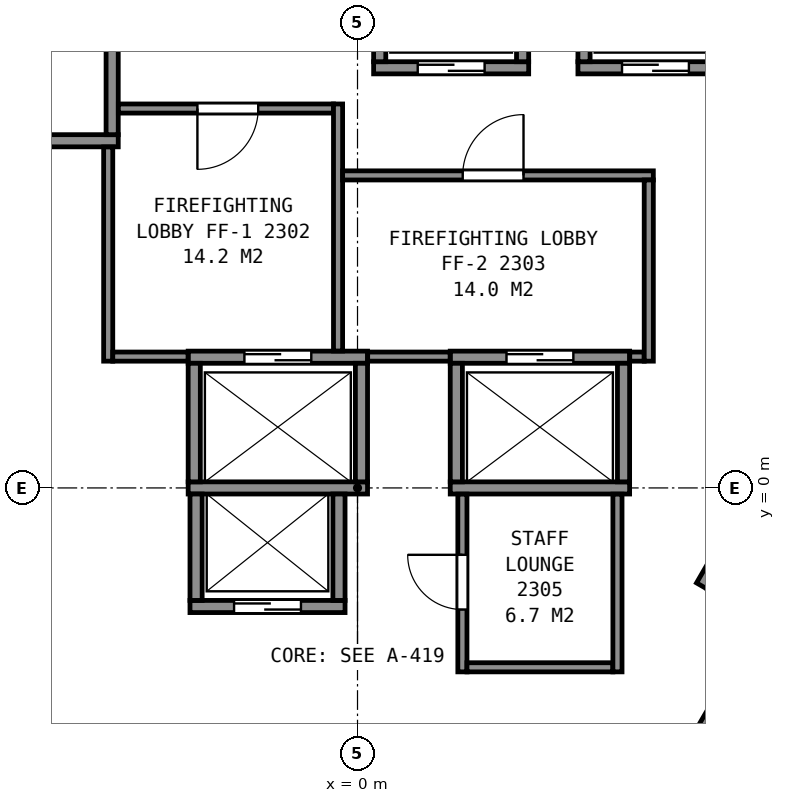
"""IFC4 building model, lengths in metres.
Left out: names, types, materials, properties, quantities, classifications, styles, units other than length and angle.
Written with IfcOpenShell. Run it as: python <this file> out.ifc"""

import sys

from ifc_helpers import new_model, si_unit, direction, frame, frame_2d, origin, place, context, subcontext, project, spatial, rectangle, extrude, element, fill, save


model = new_model("IFC4")
c1 = context("Model", 3, precision=1e-05, world=origin(), true_north=direction((0.0, 1.0)))
c2 = subcontext(c1, "Body", "Model", "MODEL_VIEW")
j1 = project(units=[si_unit("LENGTHUNIT", "METRE"), si_unit("PLANEANGLEUNIT", "RADIAN")], contexts=[c1])
p1 = place(None, origin())
s1 = spatial("IfcSite", under=j1, at=p1, CompositionType="ELEMENT")
p2 = place(p1, origin())
s2 = spatial("IfcBuilding", under=s1, at=p2, CompositionType="ELEMENT")
p3 = place(p2, frame((0.0, 0.0, 100.0)))
s3 = spatial("IfcBuildingStorey", under=s2, at=p3, CompositionType="ELEMENT", Elevation=100.0)
p4 = place(p3, frame((-2.755, -1.95, 0.0), z_axis=(0.0, 0.0, 1.0), x_axis=(1.0, 0.0, 0.0)))
e1 = element("IfcWall", 1, at=p4, inside=s3, PredefinedType="PARTITIONING", context=c2, shape_type="SweptSolid", body=[
    extrude(rectangle(XDim=2.55, YDim=0.2, at=frame_2d((1.275, 0.0))), origin(), (0.0, 0.0, 1.0), 3.6),
])
p5 = place(p4, frame((0.725, 0.0, 0.0)))
e2 = element("IfcOpeningElement", 2, at=p5, cuts=e1, PredefinedType="OPENING", context=c2, shape_type="SweptSolid", body=[
    extrude(rectangle(XDim=1.1, YDim=2.1, at=frame_2d((0.55, 1.05))), frame((0.0, 0.11, 0.0), z_axis=(0.0, -1.0, 0.0), x_axis=(1.0, 0.0, 0.0)), (0.0, 0.0, 1.0), 0.22),
])
p6 = place(p3, frame((-2.785, 0.0, 0.0), z_axis=(0.0, 0.0, 1.0), x_axis=(1.0, 0.0, 0.0)))
e3 = element("IfcWall", 3, at=p6, inside=s3, PredefinedType="PARTITIONING", context=c2, shape_type="SweptSolid", body=[
    extrude(rectangle(XDim=2.95, YDim=0.2, at=frame_2d((1.475, 0.0))), origin(), (0.0, 0.0, 1.0), 3.6),
])
p7 = place(p3, frame((1.525, 0.0, 0.0), z_axis=(0.0, 0.0, 1.0), x_axis=(1.0, 0.0, 0.0)))
e4 = element("IfcWall", 4, at=p7, inside=s3, PredefinedType="PARTITIONING", context=c2, shape_type="SweptSolid", body=[
    extrude(rectangle(XDim=2.95, YDim=0.2, at=frame_2d((1.475, 0.0))), origin(), (0.0, 0.0, 1.0), 3.6),
])
p8 = place(p3, frame((-2.785, 2.15, 0.0), z_axis=(0.0, 0.0, 1.0), x_axis=(1.0, 0.0, 0.0)))
e5 = element("IfcWall", 5, at=p8, inside=s3, PredefinedType="PARTITIONING", context=c2, shape_type="SweptSolid", body=[
    extrude(rectangle(XDim=2.95, YDim=0.2, at=frame_2d((1.475, 0.0))), origin(), (0.0, 0.0, 1.0), 3.6),
])
p9 = place(p8, frame((0.925, 0.0, 0.0)))
e6 = element("IfcOpeningElement", 6, at=p9, cuts=e5, PredefinedType="OPENING", context=c2, shape_type="SweptSolid", body=[
    extrude(rectangle(XDim=1.1, YDim=2.1, at=frame_2d((0.55, 1.05))), frame((0.0, 0.11, 0.0), z_axis=(0.0, -1.0, 0.0), x_axis=(1.0, 0.0, 0.0)), (0.0, 0.0, 1.0), 0.22),
])
p10 = place(p3, frame((1.525, 2.15, 0.0), z_axis=(0.0, 0.0, 1.0), x_axis=(1.0, 0.0, 0.0)))
e7 = element("IfcWall", 7, at=p10, inside=s3, PredefinedType="PARTITIONING", context=c2, shape_type="SweptSolid", body=[
    extrude(rectangle(XDim=2.95, YDim=0.2, at=frame_2d((1.475, 0.0))), origin(), (0.0, 0.0, 1.0), 3.6),
])
p11 = place(p10, frame((0.925, 0.0, 0.0)))
e8 = element("IfcOpeningElement", 8, at=p11, cuts=e7, PredefinedType="OPENING", context=c2, shape_type="SweptSolid", body=[
    extrude(rectangle(XDim=1.1, YDim=2.1, at=frame_2d((0.55, 1.05))), frame((0.0, 0.11, 0.0), z_axis=(0.0, -1.0, 0.0), x_axis=(1.0, 0.0, 0.0)), (0.0, 0.0, 1.0), 0.22),
])
p12 = place(p3, frame((-6.285, 5.71, 0.0), z_axis=(0.0, 0.0, 1.0), x_axis=(1.0, 0.0, 0.0)))
e9 = element("IfcWall", 9, at=p12, inside=s3, PredefinedType="PARTITIONING", context=c2, shape_type="SweptSolid", body=[
    extrude(rectangle(XDim=2.35, YDim=0.2, at=frame_2d((1.175, 0.0))), origin(), (0.0, 0.0, 1.0), 3.6),
])
p13 = place(p3, frame((0.265, 6.91, 0.0), z_axis=(0.0, 0.0, 1.0), x_axis=(1.0, 0.0, 0.0)))
e10 = element("IfcWall", 10, at=p13, inside=s3, PredefinedType="PARTITIONING", context=c2, shape_type="SweptSolid", body=[
    extrude(rectangle(XDim=2.55, YDim=0.2, at=frame_2d((1.275, 0.0))), origin(), (0.0, 0.0, 1.0), 3.6),
])
p14 = place(p13, frame((0.725, 0.0, 0.0)))
e11 = element("IfcOpeningElement", 11, at=p14, cuts=e10, PredefinedType="OPENING", context=c2, shape_type="SweptSolid", body=[
    extrude(rectangle(XDim=1.1, YDim=2.1, at=frame_2d((0.55, 1.05))), frame((0.0, 0.11, 0.0), z_axis=(0.0, -1.0, 0.0), x_axis=(1.0, 0.0, 0.0)), (0.0, 0.0, 1.0), 0.22),
])
p15 = place(p3, frame((3.625, 6.91, 0.0), z_axis=(0.0, 0.0, 1.0), x_axis=(1.0, 0.0, 0.0)))
e12 = element("IfcWall", 12, at=p15, inside=s3, PredefinedType="PARTITIONING", context=c2, shape_type="SweptSolid", body=[
    extrude(rectangle(XDim=2.55, YDim=0.2, at=frame_2d((1.275, 0.0))), origin(), (0.0, 0.0, 1.0), 3.6),
])
p16 = place(p15, frame((0.725, 0.0, 0.0)))
e13 = element("IfcOpeningElement", 13, at=p16, cuts=e12, PredefinedType="OPENING", context=c2, shape_type="SweptSolid", body=[
    extrude(rectangle(XDim=1.1, YDim=2.1, at=frame_2d((0.55, 1.05))), frame((0.0, 0.11, 0.0), z_axis=(0.0, -1.0, 0.0), x_axis=(1.0, 0.0, 0.0)), (0.0, 0.0, 1.0), 0.22),
])
p17 = place(p3, frame((5.527, -4.247, 0.0), z_axis=(0.0, 0.0, 1.0), x_axis=(0.499938297808, 0.866061024631, 0.0)))
e14 = element("IfcWall", 14, at=p17, inside=s3, PredefinedType="PARTITIONING", context=c2, shape_type="SweptSolid", body=[
    extrude(rectangle(XDim=2.35, YDim=0.2, at=frame_2d((1.175, 0.0))), origin(), (0.0, 0.0, 1.0), 3.6),
])
p18 = place(p17, frame((0.725, 0.0, 0.0)))
e15 = element("IfcOpeningElement", 15, at=p18, cuts=e14, PredefinedType="OPENING", context=c2, shape_type="SweptSolid", body=[
    extrude(rectangle(XDim=1.1, YDim=2.1, at=frame_2d((0.55, 1.05))), frame((0.0, 0.11, 0.0), z_axis=(0.0, -1.0, 0.0), x_axis=(1.0, 0.0, 0.0)), (0.0, 0.0, 1.0), 0.22),
])
p19 = place(p3, frame((5.663, -1.612, 0.0), z_axis=(0.0, 0.0, 1.0), x_axis=(0.49998122708, 0.866036242063, 0.0)))
e16 = element("IfcWall", 16, at=p19, inside=s3, PredefinedType="PARTITIONING", context=c2, shape_type="SweptSolid", body=[
    extrude(rectangle(XDim=4.9, YDim=0.2, at=frame_2d((2.45, 0.0))), origin(), (0.0, 0.0, 1.0), 3.6),
])
p20 = place(p3, frame((4.375, 0.1, 0.0), z_axis=(0.0, 0.0, 1.0), x_axis=(0.0, 1.0, 0.0)))
e17 = element("IfcWall", 17, at=p20, inside=s3, PredefinedType="PARTITIONING", context=c2, shape_type="SweptSolid", body=[
    extrude(rectangle(XDim=1.95, YDim=0.2, at=frame_2d((0.975, 0.0))), origin(), (0.0, 0.0, 1.0), 3.6),
])
for number, where, z_axis, x_axis in (
    (18, (3.725, 7.01, 0.0), (0.0, 0.0, 1.0), (0.0, 1.0, 0.0)),
    (19, (2.715, 7.01, 0.0), (0.0, 0.0, 1.0), (0.0, 1.0, 0.0)),
):
    element("IfcWall", number, at=place(p3, frame(where, z_axis=z_axis, x_axis=x_axis)), inside=s3, PredefinedType="PARTITIONING", context=c2, shape_type="SweptSolid", body=[
        extrude(rectangle(XDim=1.75, YDim=0.2, at=frame_2d((0.875, 0.0))), origin(), (0.0, 0.0, 1.0), 3.6),
    ])
p21 = place(p3, frame((1.625, 0.1, 0.0), z_axis=(0.0, 0.0, 1.0), x_axis=(0.0, 1.0, 0.0)))
e20 = element("IfcWall", 20, at=p21, inside=s3, PredefinedType="PARTITIONING", context=c2, shape_type="SweptSolid", body=[
    extrude(rectangle(XDim=1.95, YDim=0.2, at=frame_2d((0.975, 0.0))), origin(), (0.0, 0.0, 1.0), 3.6),
])
p22 = place(p3, frame((0.365, 7.01, 0.0), z_axis=(0.0, 0.0, 1.0), x_axis=(0.0, 1.0, 0.0)))
e21 = element("IfcWall", 21, at=p22, inside=s3, PredefinedType="PARTITIONING", context=c2, shape_type="SweptSolid", body=[
    extrude(rectangle(XDim=1.75, YDim=0.2, at=frame_2d((0.875, 0.0))), origin(), (0.0, 0.0, 1.0), 3.6),
])
p23 = place(p3, frame((0.065, 0.1, 0.0), z_axis=(0.0, 0.0, 1.0), x_axis=(0.0, 1.0, 0.0)))
e22 = element("IfcWall", 22, at=p23, inside=s3, PredefinedType="PARTITIONING", context=c2, shape_type="SweptSolid", body=[
    extrude(rectangle(XDim=1.95, YDim=0.2, at=frame_2d((0.975, 0.0))), origin(), (0.0, 0.0, 1.0), 3.6),
])
for number, where, z_axis, x_axis in (
    (23, (-0.305, -1.85, 0.0), (0.0, 0.0, 1.0), (0.0, 1.0, 0.0)),
    (24, (-2.655, -1.85, 0.0), (0.0, 0.0, 1.0), (0.0, 1.0, 0.0)),
):
    element("IfcWall", number, at=place(p3, frame(where, z_axis=z_axis, x_axis=x_axis)), inside=s3, PredefinedType="PARTITIONING", context=c2, shape_type="SweptSolid", body=[
        extrude(rectangle(XDim=1.75, YDim=0.2, at=frame_2d((0.875, 0.0))), origin(), (0.0, 0.0, 1.0), 3.6),
    ])
p24 = place(p3, frame((-2.685, 0.1, 0.0), z_axis=(0.0, 0.0, 1.0), x_axis=(0.0, 1.0, 0.0)))
e25 = element("IfcWall", 25, at=p24, inside=s3, PredefinedType="PARTITIONING", context=c2, shape_type="SweptSolid", body=[
    extrude(rectangle(XDim=1.95, YDim=0.2, at=frame_2d((0.975, 0.0))), origin(), (0.0, 0.0, 1.0), 3.6),
])
p25 = place(p3, frame((-4.035, 5.81, 0.0), z_axis=(0.0, 0.0, 1.0), x_axis=(0.0, 1.0, 0.0)))
e26 = element("IfcWall", 26, at=p25, inside=s3, PredefinedType="PARTITIONING", context=c2, shape_type="SweptSolid", body=[
    extrude(rectangle(XDim=1.75, YDim=0.2, at=frame_2d((0.875, 0.0))), origin(), (0.0, 0.0, 1.0), 3.6),
])
p26 = place(p3, frame((-13.664, 5.946, 0.0), z_axis=(0.0, 0.0, 1.0), x_axis=(0.499994327219, -0.866028678941, 0.0)))
e27 = element("IfcWall", 27, at=p26, inside=s3, PredefinedType="PARTITIONING", context=c2, shape_type="SweptSolid", body=[
    extrude(rectangle(XDim=23.968, YDim=0.2, at=frame_2d((11.984, 0.0))), origin(), (0.0, 0.0, 1.0), 3.35),
])
p27 = place(p3, frame((-4.278, -5.512, 0.0), z_axis=(0.0, 0.0, 1.0), x_axis=(-0.499933120428, 0.86606401328, 0.0)))
e28 = element("IfcWall", 28, at=p27, inside=s3, PredefinedType="PARTITIONING", context=c2, shape_type="SweptSolid", body=[
    extrude(rectangle(XDim=3.377, YDim=0.15, at=frame_2d((1.689, 0.0))), origin(), (0.0, 0.0, 1.0), 3.35),
])
p28 = place(p27, frame((2.177, 0.0, 0.0)))
e29 = element("IfcOpeningElement", 29, at=p28, cuts=e28, PredefinedType="OPENING", context=c2, shape_type="SweptSolid", body=[
    extrude(rectangle(XDim=0.9, YDim=2.1, at=frame_2d((0.45, 1.05))), frame((0.0, 0.085, 0.0), z_axis=(0.0, -1.0, 0.0), x_axis=(1.0, 0.0, 0.0)), (0.0, 0.0, 1.0), 0.17),
])
p29 = place(p27, frame((0.525, 0.0, 0.0)))
e30 = element("IfcOpeningElement", 30, at=p29, cuts=e28, PredefinedType="OPENING", context=c2, shape_type="SweptSolid", body=[
    extrude(rectangle(XDim=0.9, YDim=2.1, at=frame_2d((0.45, 1.05))), frame((0.0, 0.085, 0.0), z_axis=(0.0, -1.0, 0.0), x_axis=(1.0, 0.0, 0.0)), (0.0, 0.0, 1.0), 0.17),
])
p30 = place(p3, frame((-4.1, 2.085, 0.0), z_axis=(0.0, 0.0, 1.0), x_axis=(0.0, 1.0, 0.0)))
e31 = element("IfcWall", 31, at=p30, inside=s3, PredefinedType="PARTITIONING", context=c2, shape_type="SweptSolid", body=[
    extrude(rectangle(XDim=3.523, YDim=0.15, at=frame_2d((1.761, 0.0))), origin(), (0.0, 0.0, 1.0), 3.35),
])
p31 = place(p3, frame((-4.025, 2.16, 0.0), z_axis=(0.0, 0.0, 1.0), x_axis=(1.0, 0.0, 0.0)))
e32 = element("IfcWall", 32, at=p31, inside=s3, PredefinedType="PARTITIONING", context=c2, shape_type="SweptSolid", body=[
    extrude(rectangle(XDim=1.238, YDim=0.15, at=frame_2d((0.619, 0.0))), origin(), (0.0, 0.0, 1.0), 3.35),
])
p32 = place(p3, frame((-3.933, 6.24, 0.0), z_axis=(0.0, 0.0, 1.0), x_axis=(1.0, 0.0, 0.0)))
e33 = element("IfcWall", 33, at=p32, inside=s3, PredefinedType="PARTITIONING", context=c2, shape_type="SweptSolid", body=[
    extrude(rectangle(XDim=3.538, YDim=0.15, at=frame_2d((1.769, 0.0))), origin(), (0.0, 0.0, 1.0), 3.35),
])
p33 = place(p32, frame((1.3, 0.0, 0.0)))
e34 = element("IfcOpeningElement", 34, at=p33, cuts=e33, PredefinedType="OPENING", context=c2, shape_type="SweptSolid", body=[
    extrude(rectangle(XDim=1.0, YDim=2.1, at=frame_2d((0.5, 1.05))), frame((0.0, 0.085, 0.0), z_axis=(0.0, -1.0, 0.0), x_axis=(1.0, 0.0, 0.0)), (0.0, 0.0, 1.0), 0.17),
])
p34 = place(p3, frame((-0.32, 2.252, 0.0), z_axis=(0.0, 0.0, 1.0), x_axis=(0.0, 1.0, 0.0)))
e35 = element("IfcWall", 35, at=p34, inside=s3, PredefinedType="PARTITIONING", context=c2, shape_type="SweptSolid", body=[
    extrude(rectangle(XDim=4.063, YDim=0.15, at=frame_2d((2.031, 0.0))), origin(), (0.0, 0.0, 1.0), 3.35),
])
p35 = place(p3, frame((-0.245, 5.14, 0.0), z_axis=(0.0, 0.0, 1.0), x_axis=(1.0, 0.0, 0.0)))
e36 = element("IfcWall", 36, at=p35, inside=s3, PredefinedType="PARTITIONING", context=c2, shape_type="SweptSolid", body=[
    extrude(rectangle(XDim=5.11, YDim=0.15, at=frame_2d((2.555, 0.0))), origin(), (0.0, 0.0, 1.0), 3.35),
])
p36 = place(p35, frame((1.975, 0.0, 0.0)))
e37 = element("IfcOpeningElement", 37, at=p36, cuts=e36, PredefinedType="OPENING", context=c2, shape_type="SweptSolid", body=[
    extrude(rectangle(XDim=1.0, YDim=2.1, at=frame_2d((0.5, 1.05))), frame((0.0, 0.085, 0.0), z_axis=(0.0, -1.0, 0.0), x_axis=(1.0, 0.0, 0.0)), (0.0, 0.0, 1.0), 0.17),
])
p37 = place(p3, frame((0.167, 2.16, 0.0), z_axis=(0.0, 0.0, 1.0), x_axis=(1.0, 0.0, 0.0)))
e38 = element("IfcWall", 38, at=p37, inside=s3, PredefinedType="PARTITIONING", context=c2, shape_type="SweptSolid", body=[
    extrude(rectangle(XDim=1.356, YDim=0.15, at=frame_2d((0.678, 0.0))), origin(), (0.0, 0.0, 1.0), 3.35),
])
p38 = place(p3, frame((1.725, -0.102, 0.0), z_axis=(0.0, 0.0, 1.0), x_axis=(0.0, -1.0, 0.0)))
e39 = element("IfcWall", 39, at=p38, inside=s3, PredefinedType="PARTITIONING", context=c2, shape_type="SweptSolid", body=[
    extrude(rectangle(XDim=2.923, YDim=0.15, at=frame_2d((1.461, 0.0))), origin(), (0.0, 0.0, 1.0), 3.35),
])
p39 = place(p38, frame((0.998, 0.0, 0.0)))
e40 = element("IfcOpeningElement", 40, at=p39, cuts=e39, PredefinedType="OPENING", context=c2, shape_type="SweptSolid", body=[
    extrude(rectangle(XDim=0.9, YDim=2.1, at=frame_2d((0.45, 1.05))), frame((0.0, 0.085, 0.0), z_axis=(0.0, -1.0, 0.0), x_axis=(1.0, 0.0, 0.0)), (0.0, 0.0, 1.0), 0.17),
])
p40 = place(p3, frame((1.8, -2.95, 0.0), z_axis=(0.0, 0.0, 1.0), x_axis=(1.0, 0.0, 0.0)))
e41 = element("IfcWall", 41, at=p40, inside=s3, PredefinedType="PARTITIONING", context=c2, shape_type="SweptSolid", body=[
    extrude(rectangle(XDim=2.4, YDim=0.15, at=frame_2d((1.2, 0.0))), origin(), (0.0, 0.0, 1.0), 3.35),
])
p41 = place(p3, frame((4.275, -3.025, 0.0), z_axis=(0.0, 0.0, 1.0), x_axis=(0.0, 1.0, 0.0)))
e42 = element("IfcWall", 42, at=p41, inside=s3, PredefinedType="PARTITIONING", context=c2, shape_type="SweptSolid", body=[
    extrude(rectangle(XDim=2.923, YDim=0.15, at=frame_2d((1.461, 0.0))), origin(), (0.0, 0.0, 1.0), 3.35),
])
p42 = place(p3, frame((4.477, 2.16, 0.0), z_axis=(0.0, 0.0, 1.0), x_axis=(1.0, 0.0, 0.0)))
e43 = element("IfcWall", 43, at=p42, inside=s3, PredefinedType="PARTITIONING", context=c2, shape_type="SweptSolid", body=[
    extrude(rectangle(XDim=0.238, YDim=0.15, at=frame_2d((0.119, 0.0))), origin(), (0.0, 0.0, 1.0), 3.35),
])
p43 = place(p3, frame((4.79, 2.085, 0.0), z_axis=(0.0, 0.0, 1.0), x_axis=(0.0, 1.0, 0.0)))
e44 = element("IfcWall", 44, at=p43, inside=s3, PredefinedType="PARTITIONING", context=c2, shape_type="SweptSolid", body=[
    extrude(rectangle(XDim=2.98, YDim=0.15, at=frame_2d((1.49, 0.0))), origin(), (0.0, 0.0, 1.0), 3.35),
])
p44 = place(p14, origin())
e45 = element("IfcDoor", 45, at=p44, inside=s3, OperationType="SLIDING_TO_LEFT", PredefinedType="DOOR", context=c2, shape_type="SweptSolid", body=[
    extrude(rectangle(XDim=1.1, YDim=2.1, at=frame_2d((0.55, 1.05))), frame((0.0, 0.025, 0.0), z_axis=(0.0, -1.0, 0.0), x_axis=(1.0, 0.0, 0.0)), (0.0, 0.0, 1.0), 0.05),
])
fill(e11, e45)
p45 = place(p5, origin())
e46 = element("IfcDoor", 46, at=p45, inside=s3, OperationType="SLIDING_TO_RIGHT", PredefinedType="DOOR", context=c2, shape_type="SweptSolid", body=[
    extrude(rectangle(XDim=1.1, YDim=2.1, at=frame_2d((0.55, 1.05))), frame((0.0, 0.025, 0.0), z_axis=(0.0, -1.0, 0.0), x_axis=(1.0, 0.0, 0.0)), (0.0, 0.0, 1.0), 0.05),
])
fill(e2, e46)
p46 = place(p16, origin())
e47 = element("IfcDoor", 47, at=p46, inside=s3, OperationType="SLIDING_TO_LEFT", PredefinedType="DOOR", context=c2, shape_type="SweptSolid", body=[
    extrude(rectangle(XDim=1.1, YDim=2.1, at=frame_2d((0.55, 1.05))), frame((0.0, 0.025, 0.0), z_axis=(0.0, -1.0, 0.0), x_axis=(1.0, 0.0, 0.0)), (0.0, 0.0, 1.0), 0.05),
])
fill(e13, e47)
p47 = place(p9, origin())
e48 = element("IfcDoor", 48, at=p47, inside=s3, OperationType="SLIDING_TO_LEFT", PredefinedType="DOOR", context=c2, shape_type="SweptSolid", body=[
    extrude(rectangle(XDim=1.1, YDim=2.1, at=frame_2d((0.55, 1.05))), frame((0.0, 0.025, 0.0), z_axis=(0.0, -1.0, 0.0), x_axis=(1.0, 0.0, 0.0)), (0.0, 0.0, 1.0), 0.05),
])
fill(e6, e48)
p48 = place(p11, origin())
e49 = element("IfcDoor", 49, at=p48, inside=s3, OperationType="SLIDING_TO_RIGHT", PredefinedType="DOOR", context=c2, shape_type="SweptSolid", body=[
    extrude(rectangle(XDim=1.1, YDim=2.1, at=frame_2d((0.55, 1.05))), frame((0.0, 0.025, 0.0), z_axis=(0.0, -1.0, 0.0), x_axis=(1.0, 0.0, 0.0)), (0.0, 0.0, 1.0), 0.05),
])
fill(e8, e49)
p49 = place(p33, origin())
e50 = element("IfcDoor", 50, at=p49, inside=s3, OperationType="SINGLE_SWING_LEFT", PredefinedType="DOOR", context=c2, shape_type="SweptSolid", body=[
    extrude(rectangle(XDim=1.0, YDim=2.1, at=frame_2d((0.5, 1.05))), frame((0.0, 0.025, 0.0), z_axis=(0.0, -1.0, 0.0), x_axis=(1.0, 0.0, 0.0)), (0.0, 0.0, 1.0), 0.05),
])
fill(e34, e50)
p50 = place(p36, origin())
e51 = element("IfcDoor", 51, at=p50, inside=s3, OperationType="SINGLE_SWING_RIGHT", PredefinedType="DOOR", context=c2, shape_type="SweptSolid", body=[
    extrude(rectangle(XDim=1.0, YDim=2.1, at=frame_2d((0.5, 1.05))), frame((0.0, 0.025, 0.0), z_axis=(0.0, -1.0, 0.0), x_axis=(1.0, 0.0, 0.0)), (0.0, 0.0, 1.0), 0.05),
])
fill(e37, e51)
p51 = place(p39, origin())
e52 = element("IfcDoor", 52, at=p51, inside=s3, OperationType="SINGLE_SWING_LEFT", PredefinedType="DOOR", context=c2, shape_type="SweptSolid", body=[
    extrude(rectangle(XDim=0.9, YDim=2.1, at=frame_2d((0.45, 1.05))), frame((0.0, 0.025, 0.0), z_axis=(0.0, -1.0, 0.0), x_axis=(1.0, 0.0, 0.0)), (0.0, 0.0, 1.0), 0.05),
])
fill(e40, e52)
save(model, sys.argv[1])
